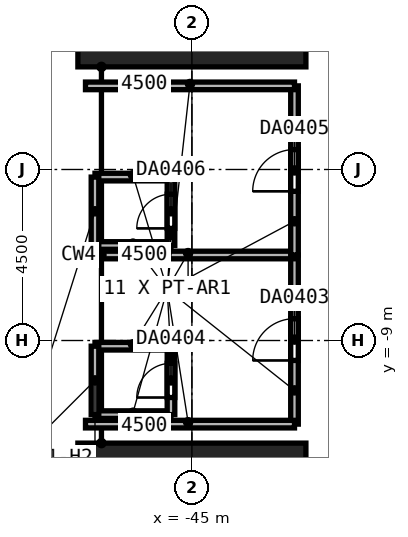
"""IFC4 building model, lengths in metres.
Left out: names, types, materials, properties, quantities, classifications, styles, units other than length and angle.
Written with IfcOpenShell. Run it as: python <this file> out.ifc"""

import sys

from ifc_helpers import new_model, si_unit, direction, frame, frame_2d, origin, origin_2d, place, context, subcontext, project, spatial, rectangle, extrude, element, fill, save


model = new_model("IFC4")
c1 = context("Model", 3, precision=1e-05, world=origin(), true_north=direction((0.0, 1.0)))
c2 = subcontext(c1, "Body", "Model", "MODEL_VIEW")
j1 = project(units=[si_unit("LENGTHUNIT", "METRE"), si_unit("PLANEANGLEUNIT", "RADIAN")], contexts=[c1])
p1 = place(None, origin())
s1 = spatial("IfcSite", under=j1, at=p1, CompositionType="ELEMENT")
p2 = place(p1, origin())
s2 = spatial("IfcBuilding", under=s1, at=p2, CompositionType="ELEMENT")
p3 = place(p2, frame((0.0, 0.0, 25.0)))
s3 = spatial("IfcBuildingStorey", under=s2, at=p3, CompositionType="ELEMENT", Elevation=25.0)
for number, where, z_axis, x_axis in (
    (1, (-45.0, -13.5, 0.0), (0.0, 0.0, 1.0), (0.0, 1.0, 0.0)),
    (2, (-45.0, 0.0, 0.0), (0.0, 0.0, 1.0), (0.0, 1.0, 0.0)),
):
    element("IfcColumn", number, at=place(p3, frame(where, z_axis=z_axis, x_axis=x_axis)), inside=s3, PredefinedType="COLUMN", context=c2, shape_type="SweptSolid", body=[
        extrude(rectangle(XDim=3.6, YDim=6.0, at=origin_2d()), origin(), (0.0, 0.0, 1.0), 6.0),
    ])
p4 = place(p3, frame((-42.3, -11.2, 0.0), z_axis=(0.0, 0.0, 1.0), x_axis=(0.0, 1.0, 0.0)))
e3 = element("IfcWall", 3, at=p4, inside=s3, PredefinedType="PARTITIONING", context=c2, shape_type="SweptSolid", body=[
    extrude(rectangle(XDim=4.45, YDim=0.2, at=frame_2d((2.225, 0.0))), origin(), (0.0, 0.0, 1.0), 5.7),
])
p5 = place(p4, frame((1.675, 0.0, 0.0)))
e4 = element("IfcOpeningElement", 4, at=p5, cuts=e3, PredefinedType="OPENING", context=c2, shape_type="SweptSolid", body=[
    extrude(rectangle(XDim=1.1, YDim=2.4, at=frame_2d((0.55, 1.2))), frame((0.0, 0.1, 0.0), z_axis=(0.0, -1.0, 0.0), x_axis=(1.0, 0.0, 0.0)), (0.0, 0.0, 1.0), 0.2),
])
for number, where, z_axis, x_axis in (
    (5, (-42.3, -11.2, 0.0), (0.0, 0.0, 1.0), (-1.0, 0.0, 0.0)),
    (6, (-47.8, -6.75, 0.0), (0.0, 0.0, 1.0), (1.0, 0.0, 0.0)),
):
    element("IfcWall", number, at=place(p3, frame(where, z_axis=z_axis, x_axis=x_axis)), inside=s3, PredefinedType="PARTITIONING", context=c2, shape_type="SweptSolid", body=[
        extrude(rectangle(XDim=5.5, YDim=0.2, at=frame_2d((2.75, 0.0))), origin(), (0.0, 0.0, 1.0), 5.7),
    ])
for number, where, z_axis, x_axis in (
    (7, (-47.55, -10.95, 0.0), (0.0, 0.0, 1.0), (1.0, 0.0, 0.0)),
    (8, (-45.55, -9.15, 0.0), (0.0, 0.0, 1.0), (-1.0, 0.0, 0.0)),
):
    element("IfcWall", number, at=place(p3, frame(where, z_axis=z_axis, x_axis=x_axis)), inside=s3, PredefinedType="PARTITIONING", context=c2, shape_type="SweptSolid", body=[
        extrude(rectangle(XDim=2.0, YDim=0.2, at=frame_2d((1.0, 0.0))), origin(), (0.0, 0.0, 1.0), 5.7),
    ])
p6 = place(p3, frame((-47.55, -10.95, 0.0), z_axis=(0.0, 0.0, 1.0), x_axis=(0.0, 1.0, 0.0)))
e9 = element("IfcWall", 9, at=p6, inside=s3, PredefinedType="PARTITIONING", context=c2, shape_type="SweptSolid", body=[
    extrude(rectangle(XDim=1.8, YDim=0.2, at=frame_2d((0.9, 0.0))), origin(), (0.0, 0.0, 1.0), 4.5),
])
p7 = place(p3, frame((-45.55, -10.95, 0.0), z_axis=(0.0, 0.0, 1.0), x_axis=(0.0, 1.0, 0.0)))
e10 = element("IfcWall", 10, at=p7, inside=s3, PredefinedType="PARTITIONING", context=c2, shape_type="SweptSolid", body=[
    extrude(rectangle(XDim=1.8, YDim=0.2, at=frame_2d((0.9, 0.0))), origin(), (0.0, 0.0, 1.0), 5.7),
])
p8 = place(p7, frame((0.45, 0.0, 0.0)))
e11 = element("IfcOpeningElement", 11, at=p8, cuts=e10, PredefinedType="OPENING", context=c2, shape_type="SweptSolid", body=[
    extrude(rectangle(XDim=0.9, YDim=2.1, at=frame_2d((0.45, 1.05))), frame((0.0, 0.1, 0.0), z_axis=(0.0, -1.0, 0.0), x_axis=(1.0, 0.0, 0.0)), (0.0, 0.0, 1.0), 0.2),
])
p9 = place(p3, frame((-42.3, -6.75, 0.0), z_axis=(0.0, 0.0, 1.0), x_axis=(0.0, 1.0, 0.0)))
e12 = element("IfcWall", 12, at=p9, inside=s3, PredefinedType="PARTITIONING", context=c2, shape_type="SweptSolid", body=[
    extrude(rectangle(XDim=4.45, YDim=0.2, at=frame_2d((2.225, 0.0))), origin(), (0.0, 0.0, 1.0), 5.7),
])
p10 = place(p9, frame((1.675, 0.0, 0.0)))
e13 = element("IfcOpeningElement", 13, at=p10, cuts=e12, PredefinedType="OPENING", context=c2, shape_type="SweptSolid", body=[
    extrude(rectangle(XDim=1.1, YDim=2.4, at=frame_2d((0.55, 1.2))), frame((0.0, 0.1, 0.0), z_axis=(0.0, -1.0, 0.0), x_axis=(1.0, 0.0, 0.0)), (0.0, 0.0, 1.0), 0.2),
])
p11 = place(p3, frame((-42.3, -2.3, 0.0), z_axis=(0.0, 0.0, 1.0), x_axis=(-1.0, 0.0, 0.0)))
e14 = element("IfcWall", 14, at=p11, inside=s3, PredefinedType="PARTITIONING", context=c2, shape_type="SweptSolid", body=[
    extrude(rectangle(XDim=5.5, YDim=0.2, at=frame_2d((2.75, 0.0))), origin(), (0.0, 0.0, 1.0), 5.7),
])
for number, where, z_axis, x_axis in (
    (15, (-47.55, -6.5, 0.0), (0.0, 0.0, 1.0), (1.0, 0.0, 0.0)),
    (16, (-45.55, -4.7, 0.0), (0.0, 0.0, 1.0), (-1.0, 0.0, 0.0)),
):
    element("IfcWall", number, at=place(p3, frame(where, z_axis=z_axis, x_axis=x_axis)), inside=s3, PredefinedType="PARTITIONING", context=c2, shape_type="SweptSolid", body=[
        extrude(rectangle(XDim=2.0, YDim=0.2, at=frame_2d((1.0, 0.0))), origin(), (0.0, 0.0, 1.0), 5.7),
    ])
p12 = place(p3, frame((-47.55, -6.5, 0.0), z_axis=(0.0, 0.0, 1.0), x_axis=(0.0, 1.0, 0.0)))
e17 = element("IfcWall", 17, at=p12, inside=s3, PredefinedType="PARTITIONING", context=c2, shape_type="SweptSolid", body=[
    extrude(rectangle(XDim=1.8, YDim=0.2, at=frame_2d((0.9, 0.0))), origin(), (0.0, 0.0, 1.0), 4.5),
])
p13 = place(p3, frame((-45.55, -6.5, 0.0), z_axis=(0.0, 0.0, 1.0), x_axis=(0.0, 1.0, 0.0)))
e18 = element("IfcWall", 18, at=p13, inside=s3, PredefinedType="PARTITIONING", context=c2, shape_type="SweptSolid", body=[
    extrude(rectangle(XDim=1.8, YDim=0.2, at=frame_2d((0.9, 0.0))), origin(), (0.0, 0.0, 1.0), 5.7),
])
p14 = place(p13, frame((0.45, 0.0, 0.0)))
e19 = element("IfcOpeningElement", 19, at=p14, cuts=e18, PredefinedType="OPENING", context=c2, shape_type="SweptSolid", body=[
    extrude(rectangle(XDim=0.9, YDim=2.1, at=frame_2d((0.45, 1.05))), frame((0.0, 0.1, 0.0), z_axis=(0.0, -1.0, 0.0), x_axis=(1.0, 0.0, 0.0)), (0.0, 0.0, 1.0), 0.2),
])
p15 = place(p5, origin())
e20 = element("IfcDoor", 20, at=p15, inside=s3, OperationType="DOUBLE_DOOR_SINGLE_SWING", PredefinedType="DOOR", context=c2, shape_type="SweptSolid", body=[
    extrude(rectangle(XDim=1.1, YDim=2.4, at=frame_2d((0.55, 1.2))), frame((0.0, 0.025, 0.0), z_axis=(0.0, -1.0, 0.0), x_axis=(1.0, 0.0, 0.0)), (0.0, 0.0, 1.0), 0.05),
])
fill(e4, e20)
p16 = place(p8, origin())
e21 = element("IfcDoor", 21, at=p16, inside=s3, OperationType="SINGLE_SWING_LEFT", PredefinedType="DOOR", context=c2, shape_type="SweptSolid", body=[
    extrude(rectangle(XDim=0.9, YDim=2.1, at=frame_2d((0.45, 1.05))), frame((0.0, 0.025, 0.0), z_axis=(0.0, -1.0, 0.0), x_axis=(1.0, 0.0, 0.0)), (0.0, 0.0, 1.0), 0.05),
])
fill(e11, e21)
p17 = place(p10, origin())
e22 = element("IfcDoor", 22, at=p17, inside=s3, OperationType="DOUBLE_DOOR_SINGLE_SWING", PredefinedType="DOOR", context=c2, shape_type="SweptSolid", body=[
    extrude(rectangle(XDim=1.1, YDim=2.4, at=frame_2d((0.55, 1.2))), frame((0.0, 0.025, 0.0), z_axis=(0.0, -1.0, 0.0), x_axis=(1.0, 0.0, 0.0)), (0.0, 0.0, 1.0), 0.05),
])
fill(e13, e22)
p18 = place(p14, origin())
e23 = element("IfcDoor", 23, at=p18, inside=s3, OperationType="SINGLE_SWING_LEFT", PredefinedType="DOOR", context=c2, shape_type="SweptSolid", body=[
    extrude(rectangle(XDim=0.9, YDim=2.1, at=frame_2d((0.45, 1.05))), frame((0.0, 0.025, 0.0), z_axis=(0.0, -1.0, 0.0), x_axis=(1.0, 0.0, 0.0)), (0.0, 0.0, 1.0), 0.05),
])
fill(e19, e23)
save(model, sys.argv[1])
